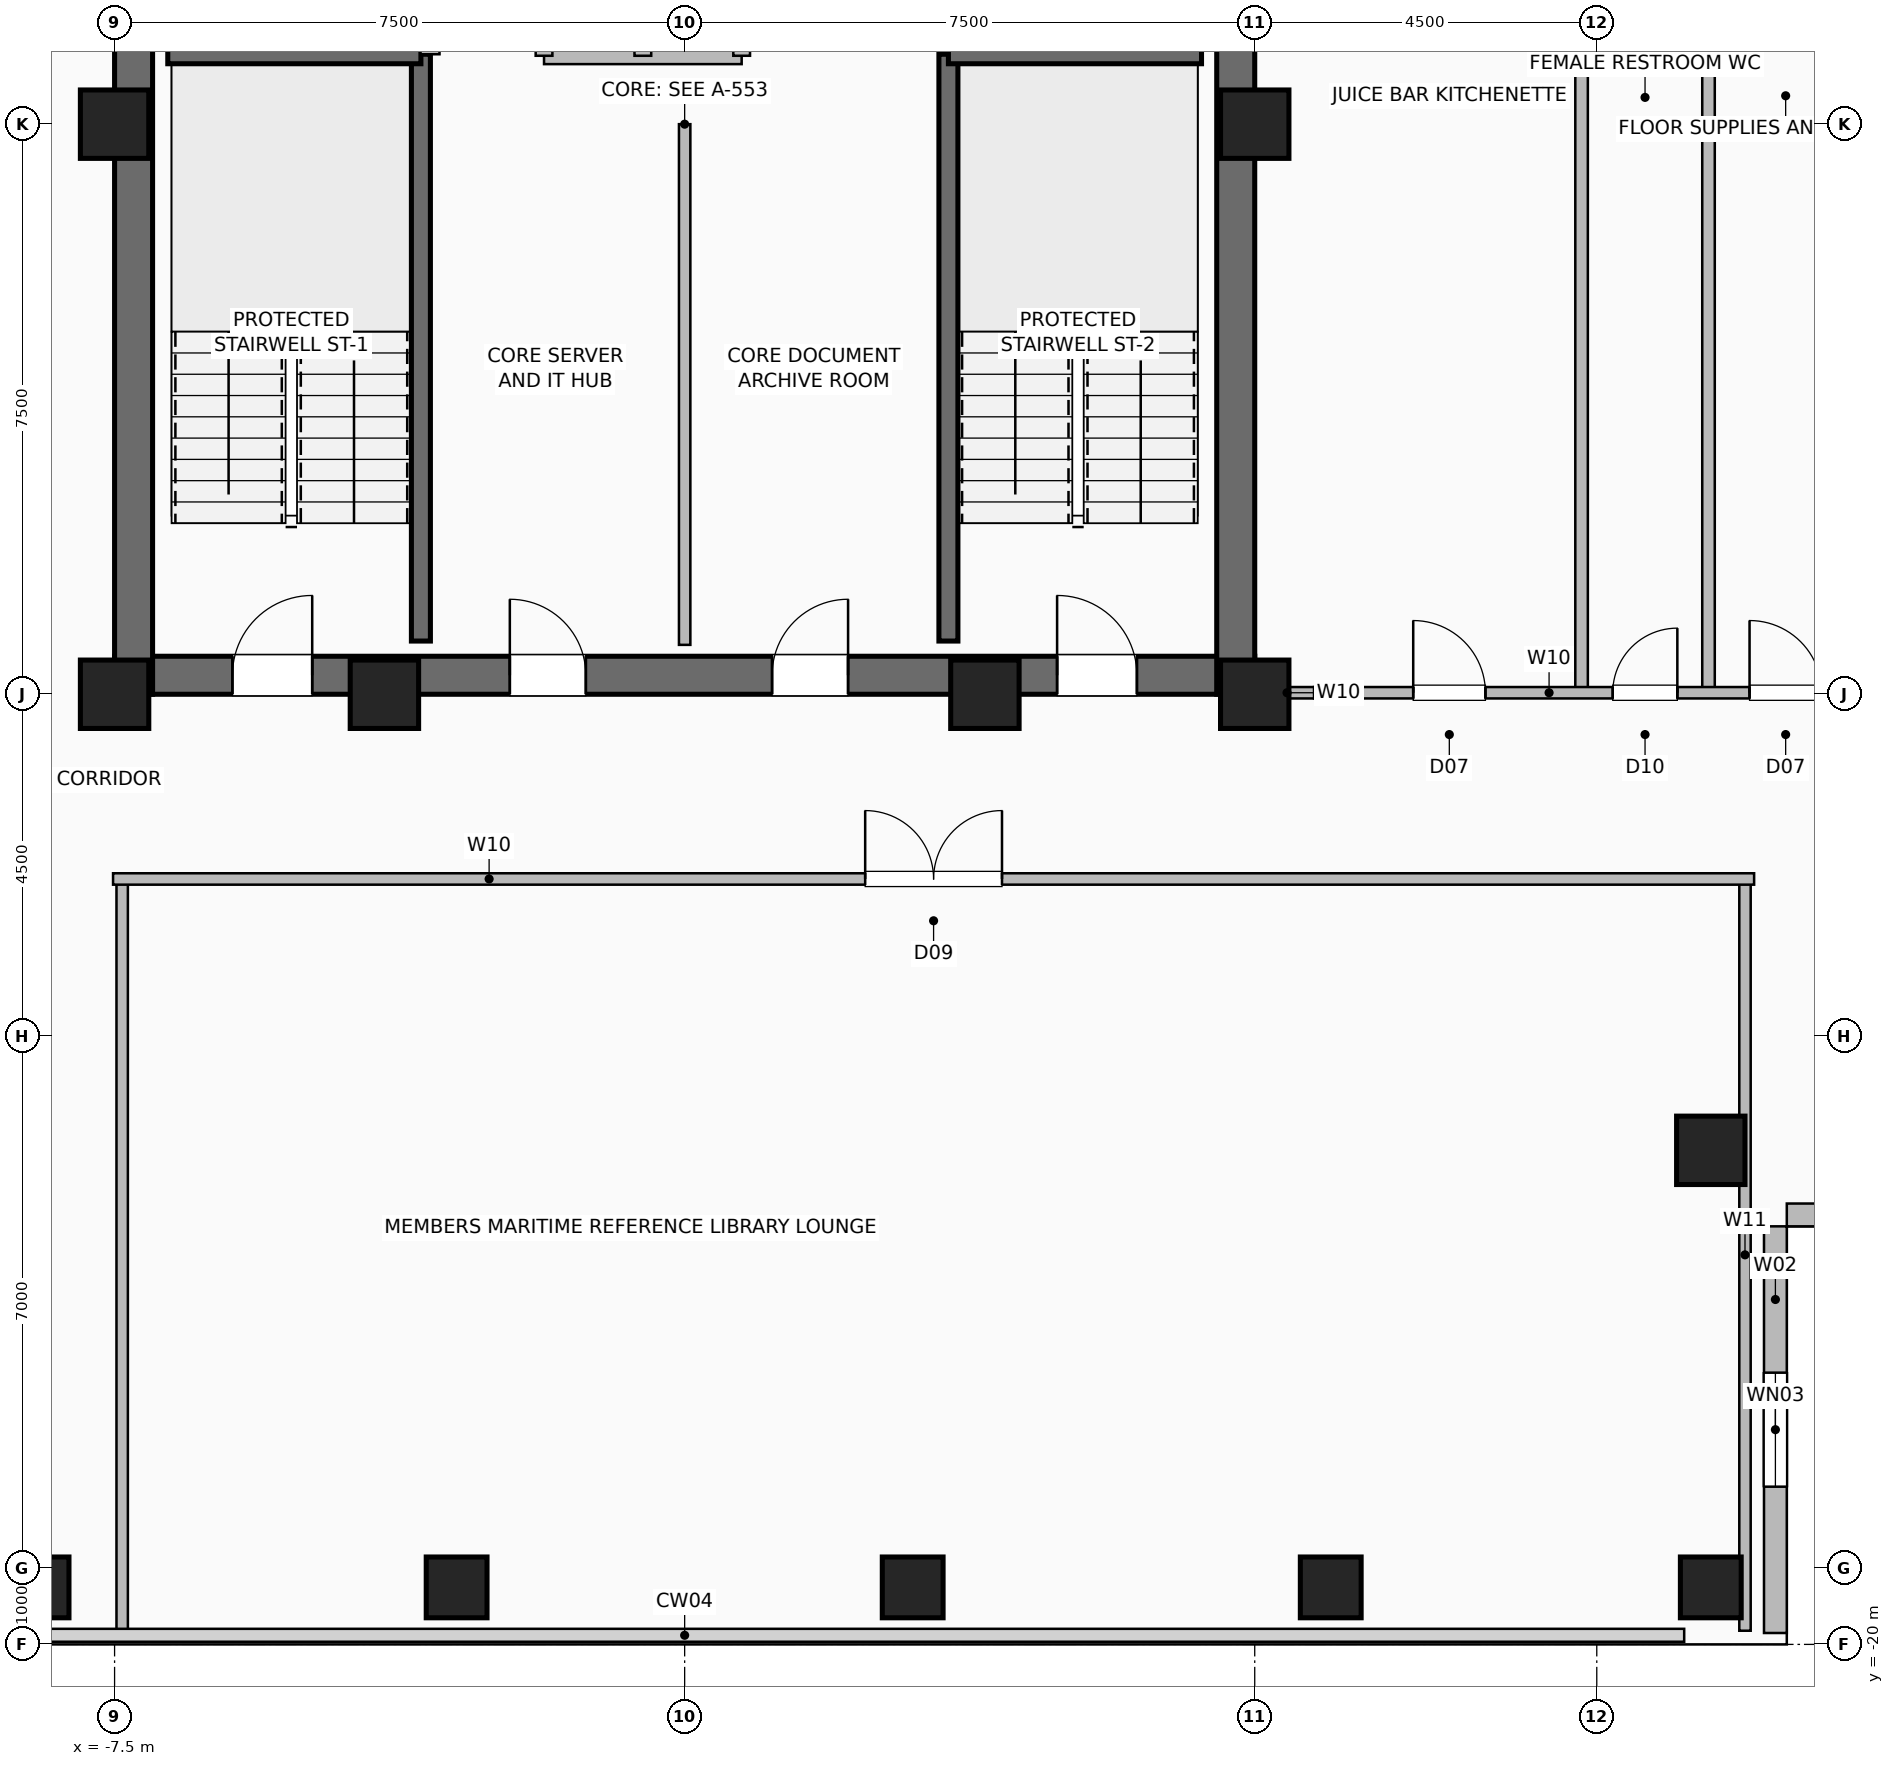
"""IFC4 building model, lengths in metres.
Left out: names, types, materials, properties, quantities, classifications, styles, units other than length and angle.
Written with IfcOpenShell. Run it as: python <this file> out.ifc"""

import sys

from ifc_helpers import new_model, si_unit, direction, frame, frame_2d, origin, origin_2d, place, context, subcontext, project, spatial, rectangle, hollow_rectangle, extrude, element, fill, save


model = new_model("IFC4")
c1 = context("Model", 3, precision=1e-05, world=origin(), true_north=direction((0.0, 1.0)))
c2 = subcontext(c1, "Body", "Model", "MODEL_VIEW")
j1 = project(units=[si_unit("LENGTHUNIT", "METRE"), si_unit("PLANEANGLEUNIT", "RADIAN")], contexts=[c1])
p1 = place(None, origin())
s1 = spatial("IfcSite", under=j1, at=p1, CompositionType="ELEMENT")
p2 = place(p1, origin())
s2 = spatial("IfcBuilding", under=s1, at=p2, CompositionType="ELEMENT")
p3 = place(p2, frame((0.0, 0.0, 209.4)))
s3 = spatial("IfcBuildingStorey", under=s2, at=p3, CompositionType="ELEMENT", Elevation=209.4)
for number, where, z_axis, x_axis in (
    (1, (-7.5, -7.5, 0.0), (0.0, 0.0, 1.0), (1.0, 0.0, 0.0)),
    (2, (-3.95, -7.5, 0.0), (0.0, 0.0, 1.0), (1.0, 0.0, 0.0)),
    (3, (3.95, -7.5, 0.0), (0.0, 0.0, 1.0), (1.0, 0.0, 0.0)),
    (4, (7.5, -7.5, 0.0), (0.0, 0.0, 1.0), (1.0, 0.0, 0.0)),
    (5, (7.5, 0.0, 0.0), (0.0, 0.0, 1.0), (1.0, 0.0, 0.0)),
    (6, (-7.5, 0.0, 0.0), (0.0, 0.0, 1.0), (1.0, 0.0, 0.0)),
):
    element("IfcColumn", number, at=place(p3, frame(where, z_axis=z_axis, x_axis=x_axis)), inside=s3, PredefinedType="COLUMN", context=c2, shape_type="SweptSolid", body=[
        extrude(hollow_rectangle(XDim=0.9, YDim=0.9, WallThickness=0.045, at=origin_2d()), origin(), (0.0, 0.0, 1.0), 3.6),
    ])
for number, where, z_axis, x_axis in (
    (7, (-8.5, -19.25, 0.0), (0.0, 0.0, 1.0), (1.0, 0.0, 0.0)),
    (8, (-3.0, -19.25, 0.0), (0.0, 0.0, 1.0), (1.0, 0.0, 0.0)),
    (9, (3.0, -19.25, 0.0), (0.0, 0.0, 1.0), (1.0, 0.0, 0.0)),
    (10, (8.5, -19.25, 0.0), (0.0, 0.0, 1.0), (1.0, 0.0, 0.0)),
    (11, (13.5, -19.25, 0.0), (0.0, 0.0, 1.0), (1.0, 0.0, 0.0)),
):
    element("IfcColumn", number, at=place(p3, frame(where, z_axis=z_axis, x_axis=x_axis)), inside=s3, PredefinedType="COLUMN", context=c2, shape_type="SweptSolid", body=[
        extrude(hollow_rectangle(XDim=0.8, YDim=0.8, WallThickness=0.04, at=origin_2d()), origin(), (0.0, 0.0, 1.0), 3.6),
    ])
p4 = place(p3, frame((13.5, -13.5, 0.0), z_axis=(0.0, 0.0, 1.0), x_axis=(1.0, 0.0, 0.0)))
e12 = element("IfcColumn", 12, at=p4, inside=s3, PredefinedType="COLUMN", context=c2, shape_type="SweptSolid", body=[
    extrude(hollow_rectangle(XDim=0.9, YDim=0.9, WallThickness=0.045, at=origin_2d()), origin(), (0.0, 0.0, 1.0), 3.6),
])
p5 = place(p3, frame((14.35, -19.85, 0.0), z_axis=(0.0, 0.0, 1.0), x_axis=(0.0, 1.0, 0.0)))
e13 = element("IfcWall", 13, at=p5, inside=s3, PredefinedType="SOLIDWALL", context=c2, shape_type="SweptSolid", body=[
    extrude(rectangle(XDim=5.35, YDim=0.3, at=frame_2d((2.675, 0.0))), origin(), (0.0, 0.0, 1.0), 3.36),
])
p6 = place(p5, frame((1.925, 0.0, 0.9)))
e14 = element("IfcOpeningElement", 14, at=p6, cuts=e13, PredefinedType="OPENING", context=c2, shape_type="SweptSolid", body=[
    extrude(rectangle(XDim=1.5, YDim=1.8, at=frame_2d((0.75, 0.9))), frame((0.0, 0.16, 0.0), z_axis=(0.0, -1.0, 0.0), x_axis=(1.0, 0.0, 0.0)), (0.0, 0.0, 1.0), 0.32),
])
p7 = place(p3, frame((19.85, -14.35, 0.0), z_axis=(0.0, 0.0, 1.0), x_axis=(-1.0, 0.0, 0.0)))
e15 = element("IfcWall", 15, at=p7, inside=s3, PredefinedType="SOLIDWALL", context=c2, shape_type="SweptSolid", body=[
    extrude(rectangle(XDim=5.35, YDim=0.3, at=frame_2d((2.675, 0.0))), origin(), (0.0, 0.0, 1.0), 3.36),
])
p8 = place(p3, frame((-7.5, -7.25, 0.0), z_axis=(0.0, 0.0, 1.0), x_axis=(1.0, 0.0, 0.0)))
e16 = element("IfcWall", 16, at=p8, inside=s3, PredefinedType="SHEAR", context=c2, shape_type="SweptSolid", body=[
    extrude(rectangle(XDim=15.0, YDim=0.5, at=frame_2d((7.5, 0.0))), origin(), (0.0, 0.0, 1.0), 3.36),
])
p9 = place(p8, frame((1.55, 0.0, 0.0)))
e17 = element("IfcOpeningElement", 17, at=p9, cuts=e16, PredefinedType="OPENING", context=c2, shape_type="SweptSolid", body=[
    extrude(rectangle(XDim=1.05, YDim=2.08, at=frame_2d((0.525, 1.04))), frame((0.0, 0.26, 0.0), z_axis=(0.0, -1.0, 0.0), x_axis=(1.0, 0.0, 0.0)), (0.0, 0.0, 1.0), 0.52),
])
p10 = place(p8, frame((12.4, 0.0, 0.0)))
e18 = element("IfcOpeningElement", 18, at=p10, cuts=e16, PredefinedType="OPENING", context=c2, shape_type="SweptSolid", body=[
    extrude(rectangle(XDim=1.05, YDim=2.08, at=frame_2d((0.525, 1.04))), frame((0.0, 0.26, 0.0), z_axis=(0.0, -1.0, 0.0), x_axis=(1.0, 0.0, 0.0)), (0.0, 0.0, 1.0), 0.52),
])
p11 = place(p8, frame((5.2, 0.0, 0.0)))
e19 = element("IfcOpeningElement", 19, at=p11, cuts=e16, PredefinedType="OPENING", context=c2, shape_type="SweptSolid", body=[
    extrude(rectangle(XDim=1.0, YDim=2.08, at=frame_2d((0.5, 1.04))), frame((0.0, 0.26, 0.0), z_axis=(0.0, -1.0, 0.0), x_axis=(1.0, 0.0, 0.0)), (0.0, 0.0, 1.0), 0.52),
])
p12 = place(p8, frame((8.65, 0.0, 0.0)))
e20 = element("IfcOpeningElement", 20, at=p12, cuts=e16, PredefinedType="OPENING", context=c2, shape_type="SweptSolid", body=[
    extrude(rectangle(XDim=1.0, YDim=2.08, at=frame_2d((0.5, 1.04))), frame((0.0, 0.26, 0.0), z_axis=(0.0, -1.0, 0.0), x_axis=(1.0, 0.0, 0.0)), (0.0, 0.0, 1.0), 0.52),
])
p13 = place(p3, frame((-7.25, -7.5, 0.0), z_axis=(0.0, 0.0, 1.0), x_axis=(0.0, 1.0, 0.0)))
e21 = element("IfcWall", 21, at=p13, inside=s3, PredefinedType="SHEAR", context=c2, shape_type="SweptSolid", body=[
    extrude(rectangle(XDim=15.0, YDim=0.5, at=frame_2d((7.5, 0.0))), origin(), (0.0, 0.0, 1.0), 3.36),
])
p14 = place(p13, frame((9.5, 0.0, 0.0)))
e22 = element("IfcOpeningElement", 22, at=p14, cuts=e21, PredefinedType="OPENING", context=c2, shape_type="SweptSolid", body=[
    extrude(rectangle(XDim=1.0, YDim=2.08, at=frame_2d((0.5, 1.04))), frame((0.0, 0.26, 0.0), z_axis=(0.0, -1.0, 0.0), x_axis=(1.0, 0.0, 0.0)), (0.0, 0.0, 1.0), 0.52),
])
p15 = place(p3, frame((7.25, -7.5, 0.0), z_axis=(0.0, 0.0, 1.0), x_axis=(0.0, 1.0, 0.0)))
e23 = element("IfcWall", 23, at=p15, inside=s3, PredefinedType="SHEAR", context=c2, shape_type="SweptSolid", body=[
    extrude(rectangle(XDim=15.0, YDim=0.5, at=frame_2d((7.5, 0.0))), origin(), (0.0, 0.0, 1.0), 3.36),
])
p16 = place(p3, frame((-3.47, -6.8, 0.0), z_axis=(0.0, 0.0, 1.0), x_axis=(0.0, 1.0, 0.0)))
e24 = element("IfcWall", 24, at=p16, inside=s3, PredefinedType="SHEAR", context=c2, shape_type="SweptSolid", body=[
    extrude(rectangle(XDim=7.72, YDim=0.25, at=frame_2d((3.86, 0.0))), origin(), (0.0, 0.0, 1.0), 3.36),
])
p17 = place(p3, frame((-6.8, 0.92, 0.0), z_axis=(0.0, 0.0, 1.0), x_axis=(1.0, 0.0, 0.0)))
e25 = element("IfcWall", 25, at=p17, inside=s3, PredefinedType="SHEAR", context=c2, shape_type="SweptSolid", body=[
    extrude(rectangle(XDim=3.33, YDim=0.25, at=frame_2d((1.665, 0.0))), origin(), (0.0, 0.0, 1.0), 3.36),
])
p18 = place(p3, frame((3.47, -6.8, 0.0), z_axis=(0.0, 0.0, 1.0), x_axis=(0.0, 1.0, 0.0)))
e26 = element("IfcWall", 26, at=p18, inside=s3, PredefinedType="SHEAR", context=c2, shape_type="SweptSolid", body=[
    extrude(rectangle(XDim=7.72, YDim=0.25, at=frame_2d((3.86, 0.0))), origin(), (0.0, 0.0, 1.0), 3.36),
])
p19 = place(p3, frame((3.47, 0.92, 0.0), z_axis=(0.0, 0.0, 1.0), x_axis=(1.0, 0.0, 0.0)))
e27 = element("IfcWall", 27, at=p19, inside=s3, PredefinedType="SHEAR", context=c2, shape_type="SweptSolid", body=[
    extrude(rectangle(XDim=3.33, YDim=0.25, at=frame_2d((1.665, 0.0))), origin(), (0.0, 0.0, 1.0), 3.36),
])
p20 = place(p3, frame((-1.85, 0.9, 0.0), z_axis=(0.0, 0.0, 1.0), x_axis=(1.0, 0.0, 0.0)))
e28 = element("IfcWall", 28, at=p20, inside=s3, PredefinedType="PARTITIONING", context=c2, shape_type="SweptSolid", body=[
    extrude(rectangle(XDim=2.6, YDim=0.22, at=frame_2d((1.3, 0.0))), origin(), (0.0, 0.0, 1.0), 3.36),
])
for number, where, z_axis, x_axis in (
    (29, (-0.55, 0.9, 0.0), (0.0, 0.0, 1.0), (0.0, 1.0, 0.0)),
    (30, (0.75, 0.9, 0.0), (0.0, 0.0, 1.0), (0.0, 1.0, 0.0)),
    (31, (-1.85, 0.9, 0.0), (0.0, 0.0, 1.0), (0.0, 1.0, 0.0)),
):
    element("IfcWall", number, at=place(p3, frame(where, z_axis=z_axis, x_axis=x_axis)), inside=s3, PredefinedType="PARTITIONING", context=c2, shape_type="SweptSolid", body=[
        extrude(rectangle(XDim=1.3, YDim=0.22, at=frame_2d((0.65, 0.0))), origin(), (0.0, 0.0, 1.0), 3.36),
    ])
p21 = place(p3, frame((-3.35, 0.92, 0.0), z_axis=(0.0, 0.0, 1.0), x_axis=(0.0, 1.0, 0.0)))
e32 = element("IfcWall", 32, at=p21, inside=s3, PredefinedType="SHEAR", context=c2, shape_type="SweptSolid", body=[
    extrude(rectangle(XDim=3.62, YDim=0.25, at=frame_2d((1.81, 0.0))), origin(), (0.0, 0.0, 1.0), 3.36),
])
p22 = place(p21, frame((1.85, 0.0, 0.0)))
e33 = element("IfcOpeningElement", 33, at=p22, cuts=e32, PredefinedType="OPENING", context=c2, shape_type="SweptSolid", body=[
    extrude(rectangle(XDim=1.0, YDim=2.08, at=frame_2d((0.5, 1.04))), frame((0.0, 0.135, 0.0), z_axis=(0.0, -1.0, 0.0), x_axis=(1.0, 0.0, 0.0)), (0.0, 0.0, 1.0), 0.27),
])
p23 = place(p3, frame((0.0, -6.85, 0.0), z_axis=(0.0, 0.0, 1.0), x_axis=(0.0, 1.0, 0.0)))
e34 = element("IfcWall", 34, at=p23, inside=s3, PredefinedType="PARTITIONING", context=c2, shape_type="SweptSolid", body=[
    extrude(rectangle(XDim=6.85, YDim=0.15, at=frame_2d((3.425, 0.0))), origin(), (0.0, 0.0, 1.0), 3.36),
])
for number, where, z_axis, x_axis in (
    (35, (-7.4, -19.82, 0.0), (0.0, 0.0, 1.0), (0.0, 1.0, 0.0)),
    (36, (13.95, -19.82, 0.0), (0.0, 0.0, 1.0), (0.0, 1.0, 0.0)),
):
    element("IfcWall", number, at=place(p3, frame(where, z_axis=z_axis, x_axis=x_axis)), inside=s3, PredefinedType="PARTITIONING", context=c2, shape_type="SweptSolid", body=[
        extrude(rectangle(XDim=9.89, YDim=0.15, at=frame_2d((4.945, 0.0))), origin(), (0.0, 0.0, 1.0), 3.36),
    ])
p24 = place(p3, frame((-7.52, -9.93, 0.0), z_axis=(0.0, 0.0, 1.0), x_axis=(1.0, 0.0, 0.0)))
e37 = element("IfcWall", 37, at=p24, inside=s3, PredefinedType="PARTITIONING", context=c2, shape_type="SweptSolid", body=[
    extrude(rectangle(XDim=21.59, YDim=0.15, at=frame_2d((10.795, 0.0))), origin(), (0.0, 0.0, 1.0), 3.36),
])
p25 = place(p24, frame((9.895, 0.0, 0.0)))
e38 = element("IfcOpeningElement", 38, at=p25, cuts=e37, PredefinedType="OPENING", context=c2, shape_type="SweptSolid", body=[
    extrude(rectangle(XDim=1.8, YDim=2.08, at=frame_2d((0.9, 1.04))), frame((0.0, 0.085, 0.0), z_axis=(0.0, -1.0, 0.0), x_axis=(1.0, 0.0, 0.0)), (0.0, 0.0, 1.0), 0.17),
])
p26 = place(p3, frame((7.45, -7.48, 0.0), z_axis=(0.0, 0.0, 1.0), x_axis=(1.0, 0.0, 0.0)))
e39 = element("IfcWall", 39, at=p26, inside=s3, PredefinedType="PARTITIONING", context=c2, shape_type="SweptSolid", body=[
    extrude(rectangle(XDim=0.95, YDim=0.15, at=frame_2d((0.475, 0.0))), origin(), (0.0, 0.0, 1.0), 3.36),
])
p27 = place(p3, frame((13.47, -7.48, 0.0), z_axis=(0.0, 0.0, 1.0), x_axis=(0.0, 1.0, 0.0)))
e40 = element("IfcWall", 40, at=p27, inside=s3, PredefinedType="PLUMBINGWALL", context=c2, shape_type="SweptSolid", body=[
    extrude(rectangle(XDim=14.9, YDim=0.165, at=frame_2d((7.45, 0.0))), origin(), (0.0, 0.0, 1.0), 2.981),
])
p28 = place(p3, frame((11.8, -7.48, 0.0), z_axis=(0.0, 0.0, 1.0), x_axis=(0.0, 1.0, 0.0)))
e41 = element("IfcWall", 41, at=p28, inside=s3, PredefinedType="PLUMBINGWALL", context=c2, shape_type="SweptSolid", body=[
    extrude(rectangle(XDim=14.9, YDim=0.165, at=frame_2d((7.45, 0.0))), origin(), (0.0, 0.0, 1.0), 3.36),
])
p29 = place(p3, frame((8.28, -7.48, 0.0), z_axis=(0.0, 0.0, 1.0), x_axis=(1.0, 0.0, 0.0)))
e42 = element("IfcWall", 42, at=p29, inside=s3, PredefinedType="PARTITIONING", context=c2, shape_type="SweptSolid", body=[
    extrude(rectangle(XDim=11.54, YDim=0.15, at=frame_2d((5.77, 0.0))), origin(), (0.0, 0.0, 1.0), 3.36),
])
p30 = place(p29, frame((1.305, 0.0, 0.0)))
e43 = element("IfcOpeningElement", 43, at=p30, cuts=e42, PredefinedType="OPENING", context=c2, shape_type="SweptSolid", body=[
    extrude(rectangle(XDim=0.95, YDim=2.06, at=frame_2d((0.475, 1.03))), frame((0.0, 0.085, 0.0), z_axis=(0.0, -1.0, 0.0), x_axis=(1.0, 0.0, 0.0)), (0.0, 0.0, 1.0), 0.17),
])
p31 = place(p29, frame((3.93, 0.0, 0.0)))
e44 = element("IfcOpeningElement", 44, at=p31, cuts=e42, PredefinedType="OPENING", context=c2, shape_type="SweptSolid", body=[
    extrude(rectangle(XDim=0.85, YDim=2.05, at=frame_2d((0.425, 1.025))), frame((0.0, 0.085, 0.0), z_axis=(0.0, -1.0, 0.0), x_axis=(1.0, 0.0, 0.0)), (0.0, 0.0, 1.0), 0.17),
])
p32 = place(p29, frame((5.73, 0.0, 0.0)))
e45 = element("IfcOpeningElement", 45, at=p32, cuts=e42, PredefinedType="OPENING", context=c2, shape_type="SweptSolid", body=[
    extrude(rectangle(XDim=0.95, YDim=2.06, at=frame_2d((0.475, 1.03))), frame((0.0, 0.085, 0.0), z_axis=(0.0, -1.0, 0.0), x_axis=(1.0, 0.0, 0.0)), (0.0, 0.0, 1.0), 0.17),
])
p33 = place(p29, frame((7.745, 0.0, 0.0)))
e46 = element("IfcOpeningElement", 46, at=p33, cuts=e42, PredefinedType="OPENING", context=c2, shape_type="SweptSolid", body=[
    extrude(rectangle(XDim=0.85, YDim=2.05, at=frame_2d((0.425, 1.025))), frame((0.0, 0.085, 0.0), z_axis=(0.0, -1.0, 0.0), x_axis=(1.0, 0.0, 0.0)), (0.0, 0.0, 1.0), 0.17),
])
p34 = place(p29, frame((9.495, 0.0, 0.0)))
e47 = element("IfcOpeningElement", 47, at=p34, cuts=e42, PredefinedType="OPENING", context=c2, shape_type="SweptSolid", body=[
    extrude(rectangle(XDim=0.95, YDim=2.06, at=frame_2d((0.475, 1.03))), frame((0.0, 0.085, 0.0), z_axis=(0.0, -1.0, 0.0), x_axis=(1.0, 0.0, 0.0)), (0.0, 0.0, 1.0), 0.17),
])
p35 = place(p6, origin())
e48 = element("IfcWindow", 48, at=p35, inside=s3, PartitioningType="SINGLE_PANEL", PredefinedType="WINDOW", context=c2, shape_type="SweptSolid", body=[
    extrude(rectangle(XDim=1.5, YDim=1.8, at=frame_2d((0.75, 0.9))), frame((0.0, 0.03, 0.0), z_axis=(0.0, -1.0, 0.0), x_axis=(1.0, 0.0, 0.0)), (0.0, 0.0, 1.0), 0.06),
])
fill(e14, e48)
p36 = place(p9, origin())
e49 = element("IfcDoor", 49, at=p36, inside=s3, OperationType="SINGLE_SWING_RIGHT", PredefinedType="DOOR", context=c2, shape_type="SweptSolid", body=[
    extrude(rectangle(XDim=1.05, YDim=2.08, at=frame_2d((0.525, 1.04))), frame((0.0, 0.025, 0.0), z_axis=(0.0, -1.0, 0.0), x_axis=(1.0, 0.0, 0.0)), (0.0, 0.0, 1.0), 0.05),
])
fill(e17, e49)
p37 = place(p10, origin())
e50 = element("IfcDoor", 50, at=p37, inside=s3, OperationType="SINGLE_SWING_LEFT", PredefinedType="DOOR", context=c2, shape_type="SweptSolid", body=[
    extrude(rectangle(XDim=1.05, YDim=2.08, at=frame_2d((0.525, 1.04))), frame((0.0, 0.025, 0.0), z_axis=(0.0, -1.0, 0.0), x_axis=(1.0, 0.0, 0.0)), (0.0, 0.0, 1.0), 0.05),
])
fill(e18, e50)
p38 = place(p11, origin())
e51 = element("IfcDoor", 51, at=p38, inside=s3, OperationType="SINGLE_SWING_LEFT", PredefinedType="DOOR", context=c2, shape_type="SweptSolid", body=[
    extrude(rectangle(XDim=1.0, YDim=2.08, at=frame_2d((0.5, 1.04))), frame((0.0, 0.025, 0.0), z_axis=(0.0, -1.0, 0.0), x_axis=(1.0, 0.0, 0.0)), (0.0, 0.0, 1.0), 0.05),
])
fill(e19, e51)
p39 = place(p12, origin())
e52 = element("IfcDoor", 52, at=p39, inside=s3, OperationType="SINGLE_SWING_RIGHT", PredefinedType="DOOR", context=c2, shape_type="SweptSolid", body=[
    extrude(rectangle(XDim=1.0, YDim=2.08, at=frame_2d((0.5, 1.04))), frame((0.0, 0.025, 0.0), z_axis=(0.0, -1.0, 0.0), x_axis=(1.0, 0.0, 0.0)), (0.0, 0.0, 1.0), 0.05),
])
fill(e20, e52)
p40 = place(p25, origin())
e53 = element("IfcDoor", 53, at=p40, inside=s3, OperationType="DOUBLE_DOOR_SINGLE_SWING", PredefinedType="DOOR", context=c2, shape_type="SweptSolid", body=[
    extrude(rectangle(XDim=1.8, YDim=2.08, at=frame_2d((0.9, 1.04))), frame((0.0, 0.025, 0.0), z_axis=(0.0, -1.0, 0.0), x_axis=(1.0, 0.0, 0.0)), (0.0, 0.0, 1.0), 0.05),
])
fill(e38, e53)
p41 = place(p30, origin())
e54 = element("IfcDoor", 54, at=p41, inside=s3, OperationType="SINGLE_SWING_LEFT", PredefinedType="DOOR", context=c2, shape_type="SweptSolid", body=[
    extrude(rectangle(XDim=0.95, YDim=2.06, at=frame_2d((0.475, 1.03))), frame((0.0, 0.025, 0.0), z_axis=(0.0, -1.0, 0.0), x_axis=(1.0, 0.0, 0.0)), (0.0, 0.0, 1.0), 0.05),
])
fill(e43, e54)
p42 = place(p31, origin())
e55 = element("IfcDoor", 55, at=p42, inside=s3, OperationType="SINGLE_SWING_RIGHT", PredefinedType="DOOR", context=c2, shape_type="SweptSolid", body=[
    extrude(rectangle(XDim=0.85, YDim=2.05, at=frame_2d((0.425, 1.025))), frame((0.0, 0.025, 0.0), z_axis=(0.0, -1.0, 0.0), x_axis=(1.0, 0.0, 0.0)), (0.0, 0.0, 1.0), 0.05),
])
fill(e44, e55)
p43 = place(p32, origin())
e56 = element("IfcDoor", 56, at=p43, inside=s3, OperationType="SINGLE_SWING_LEFT", PredefinedType="DOOR", context=c2, shape_type="SweptSolid", body=[
    extrude(rectangle(XDim=0.95, YDim=2.06, at=frame_2d((0.475, 1.03))), frame((0.0, 0.025, 0.0), z_axis=(0.0, -1.0, 0.0), x_axis=(1.0, 0.0, 0.0)), (0.0, 0.0, 1.0), 0.05),
])
fill(e45, e56)
save(model, sys.argv[1])
